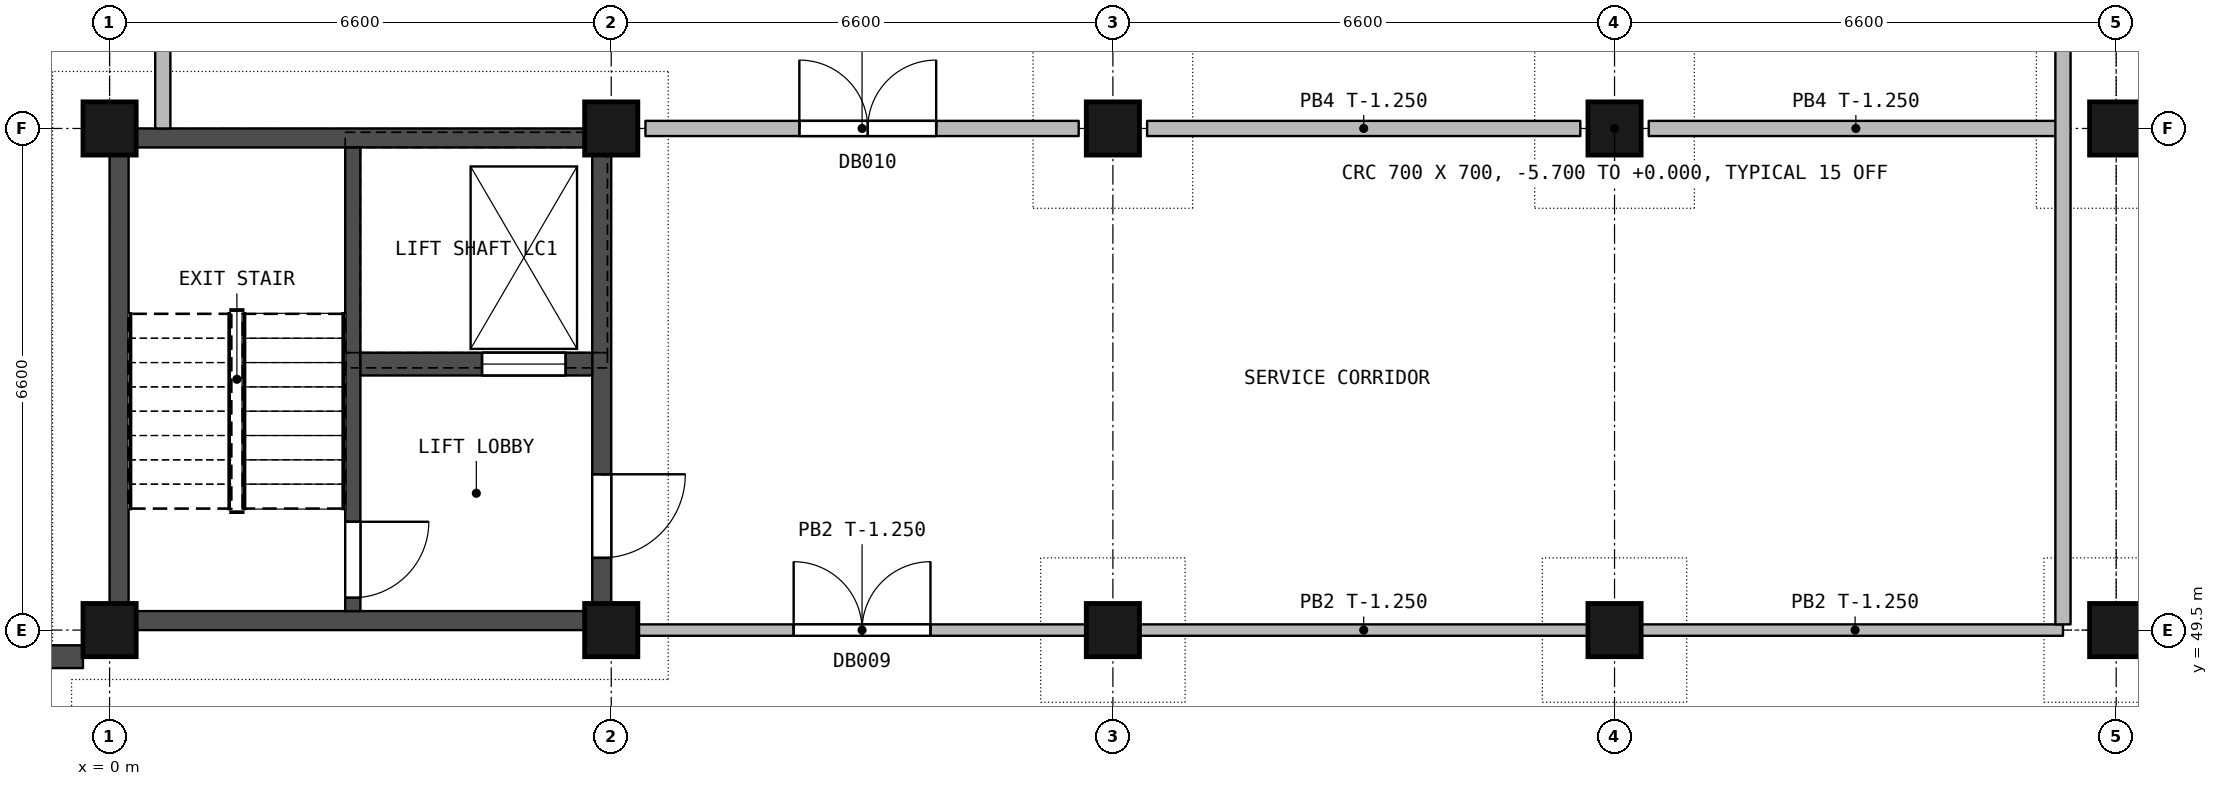
"""IFC4 building model, lengths in metres.
Left out: names, types, materials, properties, quantities, classifications, styles, units other than length and angle.
Written with IfcOpenShell. Run it as: python <this file> out.ifc"""

import sys

from ifc_helpers import new_model, si_unit, direction, frame, frame_2d, origin, origin_2d, place, context, subcontext, project, spatial, rectangle, extrude, element, fill, save


model = new_model("IFC4")
c1 = context("Model", 3, precision=1e-05, world=origin(), true_north=direction((0.0, 1.0)))
c2 = subcontext(c1, "Body", "Model", "MODEL_VIEW")
j1 = project(units=[si_unit("LENGTHUNIT", "METRE"), si_unit("PLANEANGLEUNIT", "RADIAN")], contexts=[c1])
p1 = place(None, origin())
s1 = spatial("IfcSite", under=j1, at=p1, CompositionType="ELEMENT")
p2 = place(p1, origin())
s2 = spatial("IfcBuilding", under=s1, at=p2, CompositionType="ELEMENT")
p3 = place(p2, frame((0.0, 0.0, -5.7)))
s3 = spatial("IfcBuildingStorey", under=s2, at=p3, CompositionType="ELEMENT", Elevation=-5.7)
for number, where, z_axis, x_axis in (
    (1, (0.0, 49.5, 0.0), (0.0, 0.0, 1.0), (1.0, 0.0, 0.0)),
    (2, (0.0, 56.1, 0.0), (0.0, 0.0, 1.0), (1.0, 0.0, 0.0)),
    (3, (6.6, 49.5, 0.0), (0.0, 0.0, 1.0), (1.0, 0.0, 0.0)),
    (4, (6.6, 56.1, 0.0), (0.0, 0.0, 1.0), (1.0, 0.0, 0.0)),
    (5, (13.2, 49.5, 0.0), (0.0, 0.0, 1.0), (1.0, 0.0, 0.0)),
    (6, (13.2, 56.1, 0.0), (0.0, 0.0, 1.0), (1.0, 0.0, 0.0)),
    (7, (19.8, 49.5, 0.0), (0.0, 0.0, 1.0), (1.0, 0.0, 0.0)),
    (8, (19.8, 56.1, 0.0), (0.0, 0.0, 1.0), (1.0, 0.0, 0.0)),
    (9, (26.4, 49.5, 0.0), (0.0, 0.0, 1.0), (1.0, 0.0, 0.0)),
    (10, (26.4, 56.1, 0.0), (0.0, 0.0, 1.0), (1.0, 0.0, 0.0)),
):
    element("IfcColumn", number, at=place(p3, frame(where, z_axis=z_axis, x_axis=x_axis)), inside=s3, PredefinedType="COLUMN", context=c2, shape_type="SweptSolid", body=[
        extrude(rectangle(XDim=0.7, YDim=0.7, at=origin_2d()), origin(), (0.0, 0.0, 1.0), 5.7),
    ])
p4 = place(p3, frame((6.475, 49.5, 0.0), z_axis=(0.0, 0.0, 1.0), x_axis=(0.0, 1.0, 0.0)))
e11 = element("IfcWall", 11, at=p4, inside=s3, PredefinedType="SHEAR", context=c2, shape_type="SweptSolid", body=[
    extrude(rectangle(XDim=6.6, YDim=0.25, at=frame_2d((3.3, 0.0))), origin(), (0.0, 0.0, 1.0), 5.2),
])
p5 = place(p4, frame((0.95, 0.0, 0.0)))
e12 = element("IfcOpeningElement", 12, at=p5, cuts=e11, PredefinedType="OPENING", context=c2, shape_type="SweptSolid", body=[
    extrude(rectangle(XDim=1.1, YDim=2.1, at=frame_2d((0.55, 1.05))), frame((0.0, 0.135, 0.0), z_axis=(0.0, -1.0, 0.0), x_axis=(1.0, 0.0, 0.0)), (0.0, 0.0, 1.0), 0.27),
])
p6 = place(p3, frame((0.125, 49.5, 0.0), z_axis=(0.0, 0.0, 1.0), x_axis=(0.0, 1.0, 0.0)))
e13 = element("IfcWall", 13, at=p6, inside=s3, PredefinedType="SHEAR", context=c2, shape_type="SweptSolid", body=[
    extrude(rectangle(XDim=6.6, YDim=0.25, at=frame_2d((3.3, 0.0))), origin(), (0.0, 0.0, 1.0), 5.2),
])
for number, where, z_axis, x_axis in (
    (14, (6.35, 49.625, 0.0), (0.0, 0.0, 1.0), (-1.0, 0.0, 0.0)),
    (15, (6.35, 55.975, 0.0), (0.0, 0.0, 1.0), (-1.0, 0.0, 0.0)),
):
    element("IfcWall", number, at=place(p3, frame(where, z_axis=z_axis, x_axis=x_axis)), inside=s3, PredefinedType="SHEAR", context=c2, shape_type="SweptSolid", body=[
        extrude(rectangle(XDim=6.1, YDim=0.25, at=frame_2d((3.05, 0.0))), origin(), (0.0, 0.0, 1.0), 5.2),
    ])
p7 = place(p3, frame((3.2, 49.75, 0.0), z_axis=(0.0, 0.0, 1.0), x_axis=(0.0, 1.0, 0.0)))
e16 = element("IfcWall", 16, at=p7, inside=s3, PredefinedType="SHEAR", context=c2, shape_type="SweptSolid", body=[
    extrude(rectangle(XDim=6.1, YDim=0.2, at=frame_2d((3.05, 0.0))), origin(), (0.0, 0.0, 1.0), 5.2),
])
p8 = place(p7, frame((0.175, 0.0, 0.0)))
e17 = element("IfcOpeningElement", 17, at=p8, cuts=e16, PredefinedType="OPENING", context=c2, shape_type="SweptSolid", body=[
    extrude(rectangle(XDim=1.0, YDim=2.1, at=frame_2d((0.5, 1.05))), frame((0.0, 0.11, 0.0), z_axis=(0.0, -1.0, 0.0), x_axis=(1.0, 0.0, 0.0)), (0.0, 0.0, 1.0), 0.22),
])
p9 = place(p3, frame((6.35, 53.0, 0.0), z_axis=(0.0, 0.0, 1.0), x_axis=(-1.0, 0.0, 0.0)))
e18 = element("IfcWall", 18, at=p9, inside=s3, PredefinedType="SHEAR", context=c2, shape_type="SweptSolid", body=[
    extrude(rectangle(XDim=3.05, YDim=0.3, at=frame_2d((1.525, 0.0))), origin(), (0.0, 0.0, 1.0), 5.2),
])
p10 = place(p9, frame((0.35, 0.0, 0.0)))
e19 = element("IfcOpeningElement", 19, at=p10, cuts=e18, PredefinedType="OPENING", context=c2, shape_type="SweptSolid", body=[
    extrude(rectangle(XDim=1.1, YDim=2.2, at=frame_2d((0.55, 1.1))), frame((0.0, 0.16, 0.0), z_axis=(0.0, -1.0, 0.0), x_axis=(1.0, 0.0, 0.0)), (0.0, 0.0, 1.0), 0.32),
])
for number, where, z_axis, x_axis in (
    (20, (3.1, 53.05, -1.2), (0.0, 0.0, 1.0), (1.0, 0.0, 0.0)),
    (21, (3.1, 55.95, -1.2), (0.0, 0.0, 1.0), (1.0, 0.0, 0.0)),
):
    element("IfcWall", number, at=place(p3, frame(where, z_axis=z_axis, x_axis=x_axis)), inside=s3, PredefinedType="SHEAR", context=c2, shape_type="SweptSolid", body=[
        extrude(rectangle(XDim=3.45, YDim=0.2, at=frame_2d((1.725, 0.0))), origin(), (0.0, 0.0, 1.0), 0.6),
    ])
for number, where, z_axis, x_axis in (
    (22, (3.2, 53.15, -1.2), (0.0, 0.0, 1.0), (0.0, 1.0, 0.0)),
    (23, (6.45, 53.15, -1.2), (0.0, 0.0, 1.0), (0.0, 1.0, 0.0)),
):
    element("IfcWall", number, at=place(p3, frame(where, z_axis=z_axis, x_axis=x_axis)), inside=s3, PredefinedType="SHEAR", context=c2, shape_type="SweptSolid", body=[
        extrude(rectangle(XDim=2.7, YDim=0.2, at=frame_2d((1.35, 0.0))), origin(), (0.0, 0.0, 1.0), 0.6),
    ])
p11 = place(p3, frame((-6.58, 49.15, 0.0), z_axis=(0.0, 0.0, 1.0), x_axis=(1.0, 0.0, 0.0)))
e24 = element("IfcWall", 24, at=p11, inside=s3, PredefinedType="SOLIDWALL", context=c2, shape_type="SweptSolid", body=[
    extrude(rectangle(XDim=6.23, YDim=0.3, at=frame_2d((3.115, 0.0))), origin(), (0.0, 0.0, 1.0), 6.8),
])
p12 = place(p3, frame((6.95, 49.5, 0.0), z_axis=(0.0, 0.0, 1.0), x_axis=(1.0, 0.0, 0.0)))
e25 = element("IfcWall", 25, at=p12, inside=s3, PredefinedType="PARTITIONING", context=c2, shape_type="SweptSolid", body=[
    extrude(rectangle(XDim=5.9, YDim=0.15, at=frame_2d((2.95, 0.0))), origin(), (0.0, 0.0, 1.0), 4.45),
])
p13 = place(p12, frame((2.05, 0.0, 0.0)))
e26 = element("IfcOpeningElement", 26, at=p13, cuts=e25, PredefinedType="OPENING", context=c2, shape_type="SweptSolid", body=[
    extrude(rectangle(XDim=1.8, YDim=2.1, at=frame_2d((0.9, 1.05))), frame((0.0, 0.085, 0.0), z_axis=(0.0, -1.0, 0.0), x_axis=(1.0, 0.0, 0.0)), (0.0, 0.0, 1.0), 0.17),
])
p14 = place(p3, frame((13.55, 49.5, 0.0), z_axis=(0.0, 0.0, 1.0), x_axis=(1.0, 0.0, 0.0)))
e27 = element("IfcWall", 27, at=p14, inside=s3, PredefinedType="PARTITIONING", context=c2, shape_type="SweptSolid", body=[
    extrude(rectangle(XDim=5.9, YDim=0.15, at=frame_2d((2.95, 0.0))), origin(), (0.0, 0.0, 1.0), 4.45),
])
p15 = place(p3, frame((20.15, 49.5, 0.0), z_axis=(0.0, 0.0, 1.0), x_axis=(1.0, 0.0, 0.0)))
e28 = element("IfcWall", 28, at=p15, inside=s3, PredefinedType="PARTITIONING", context=c2, shape_type="SweptSolid", body=[
    extrude(rectangle(XDim=5.55, YDim=0.15, at=frame_2d((2.775, 0.0))), origin(), (0.0, 0.0, 1.0), 4.45),
])
p16 = place(p3, frame((7.05, 56.1, 0.0), z_axis=(0.0, 0.0, 1.0), x_axis=(1.0, 0.0, 0.0)))
e29 = element("IfcWall", 29, at=p16, inside=s3, PredefinedType="PARTITIONING", context=c2, shape_type="SweptSolid", body=[
    extrude(rectangle(XDim=5.7, YDim=0.2, at=frame_2d((2.85, 0.0))), origin(), (0.0, 0.0, 1.0), 4.45),
])
p17 = place(p16, frame((2.025, 0.0, 0.0)))
e30 = element("IfcOpeningElement", 30, at=p17, cuts=e29, PredefinedType="OPENING", context=c2, shape_type="SweptSolid", body=[
    extrude(rectangle(XDim=1.8, YDim=2.1, at=frame_2d((0.9, 1.05))), frame((0.0, 0.11, 0.0), z_axis=(0.0, -1.0, 0.0), x_axis=(1.0, 0.0, 0.0)), (0.0, 0.0, 1.0), 0.22),
])
p18 = place(p3, frame((13.65, 56.1, 0.0), z_axis=(0.0, 0.0, 1.0), x_axis=(1.0, 0.0, 0.0)))
e31 = element("IfcWall", 31, at=p18, inside=s3, PredefinedType="PARTITIONING", context=c2, shape_type="SweptSolid", body=[
    extrude(rectangle(XDim=5.7, YDim=0.2, at=frame_2d((2.85, 0.0))), origin(), (0.0, 0.0, 1.0), 4.45),
])
p19 = place(p3, frame((20.25, 56.1, 0.0), z_axis=(0.0, 0.0, 1.0), x_axis=(1.0, 0.0, 0.0)))
e32 = element("IfcWall", 32, at=p19, inside=s3, PredefinedType="PARTITIONING", context=c2, shape_type="SweptSolid", body=[
    extrude(rectangle(XDim=5.45, YDim=0.2, at=frame_2d((2.725, 0.0))), origin(), (0.0, 0.0, 1.0), 4.45),
])
p20 = place(p3, frame((0.7, 56.1, 0.0), z_axis=(0.0, 0.0, 1.0), x_axis=(0.0, 1.0, 0.0)))
e33 = element("IfcWall", 33, at=p20, inside=s3, PredefinedType="PARTITIONING", context=c2, shape_type="SweptSolid", body=[
    extrude(rectangle(XDim=19.2, YDim=0.2, at=frame_2d((9.6, 0.0))), origin(), (0.0, 0.0, 1.0), 4.45),
])
p21 = place(p3, frame((25.7, 49.575, 0.0), z_axis=(0.0, 0.0, 1.0), x_axis=(0.0, 1.0, 0.0)))
e34 = element("IfcWall", 34, at=p21, inside=s3, PredefinedType="PARTITIONING", context=c2, shape_type="SweptSolid", body=[
    extrude(rectangle(XDim=19.725, YDim=0.2, at=frame_2d((9.863, 0.0))), origin(), (0.0, 0.0, 1.0), 4.45),
])
p22 = place(p5, origin())
e35 = element("IfcDoor", 35, at=p22, inside=s3, OperationType="SINGLE_SWING_RIGHT", PredefinedType="DOOR", context=c2, shape_type="SweptSolid", body=[
    extrude(rectangle(XDim=1.1, YDim=2.1, at=frame_2d((0.55, 1.05))), frame((0.0, 0.025, 0.0), z_axis=(0.0, -1.0, 0.0), x_axis=(1.0, 0.0, 0.0)), (0.0, 0.0, 1.0), 0.05),
])
fill(e12, e35)
p23 = place(p8, origin())
e36 = element("IfcDoor", 36, at=p23, inside=s3, OperationType="SINGLE_SWING_RIGHT", PredefinedType="DOOR", context=c2, shape_type="SweptSolid", body=[
    extrude(rectangle(XDim=1.0, YDim=2.1, at=frame_2d((0.5, 1.05))), frame((0.0, 0.025, 0.0), z_axis=(0.0, -1.0, 0.0), x_axis=(1.0, 0.0, 0.0)), (0.0, 0.0, 1.0), 0.05),
])
fill(e17, e36)
p24 = place(p10, origin())
e37 = element("IfcDoor", 37, at=p24, inside=s3, OperationType="DOUBLE_DOOR_SLIDING", PredefinedType="NOTDEFINED", context=c2, shape_type="SweptSolid", body=[
    extrude(rectangle(XDim=1.1, YDim=2.2, at=frame_2d((0.55, 1.1))), frame((0.0, 0.025, 0.0), z_axis=(0.0, -1.0, 0.0), x_axis=(1.0, 0.0, 0.0)), (0.0, 0.0, 1.0), 0.05),
])
fill(e19, e37)
p25 = place(p13, origin())
e38 = element("IfcDoor", 38, at=p25, inside=s3, OperationType="DOUBLE_DOOR_SINGLE_SWING", PredefinedType="DOOR", context=c2, shape_type="SweptSolid", body=[
    extrude(rectangle(XDim=1.8, YDim=2.1, at=frame_2d((0.9, 1.05))), frame((0.0, 0.025, 0.0), z_axis=(0.0, -1.0, 0.0), x_axis=(1.0, 0.0, 0.0)), (0.0, 0.0, 1.0), 0.05),
])
fill(e26, e38)
p26 = place(p17, origin())
e39 = element("IfcDoor", 39, at=p26, inside=s3, OperationType="DOUBLE_DOOR_SINGLE_SWING", PredefinedType="DOOR", context=c2, shape_type="SweptSolid", body=[
    extrude(rectangle(XDim=1.8, YDim=2.1, at=frame_2d((0.9, 1.05))), frame((0.0, 0.025, 0.0), z_axis=(0.0, -1.0, 0.0), x_axis=(1.0, 0.0, 0.0)), (0.0, 0.0, 1.0), 0.05),
])
fill(e30, e39)
save(model, sys.argv[1])
